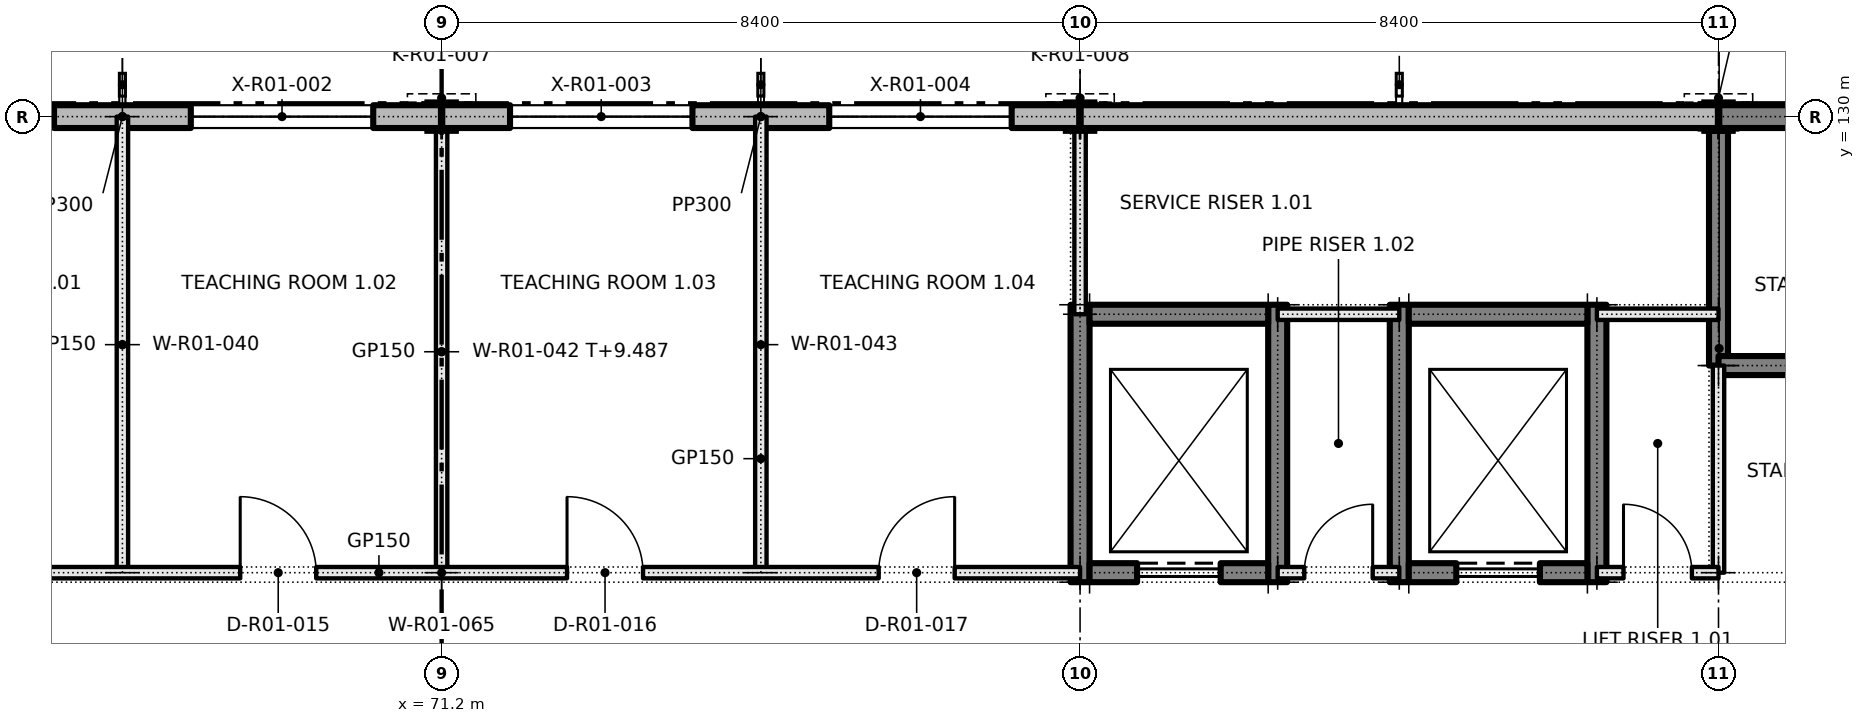
"""IFC4 building model, lengths in metres.
Left out: names, types, materials, properties, quantities, classifications, styles, units other than length and angle.
Written with IfcOpenShell. Run it as: python <this file> out.ifc"""

import sys

from ifc_helpers import new_model, si_unit, direction, frame, frame_2d, origin, origin_2d, place, context, subcontext, project, spatial, rectangle, i_section, extrude, element, fill, save


model = new_model("IFC4")
c1 = context("Model", 3, precision=1e-05, world=origin(), true_north=direction((0.0, 1.0)))
c2 = subcontext(c1, "Body", "Model", "MODEL_VIEW")
j1 = project(units=[si_unit("LENGTHUNIT", "METRE"), si_unit("PLANEANGLEUNIT", "RADIAN")], contexts=[c1])
p1 = place(None, origin())
s1 = spatial("IfcSite", under=j1, at=p1, CompositionType="ELEMENT")
p2 = place(p1, origin())
s2 = spatial("IfcBuilding", under=s1, at=p2, CompositionType="ELEMENT")
p3 = place(p2, frame((0.0, 0.0, 5.4)))
s3 = spatial("IfcBuildingStorey", under=s2, at=p3, CompositionType="ELEMENT", Elevation=5.4)
for number, where, z_axis, x_axis in (
    (1, (79.6, 123.875, 0.0), (0.0, 0.0, 1.0), (0.0, 1.0, 0.0)),
    (2, (82.2, 123.875, 0.0), (0.0, 0.0, 1.0), (0.0, 1.0, 0.0)),
):
    element("IfcWall", number, at=place(p3, frame(where, z_axis=z_axis, x_axis=x_axis)), inside=s3, PredefinedType="SOLIDWALL", context=c2, shape_type="SweptSolid", body=[
        extrude(rectangle(XDim=3.65, YDim=0.25, at=frame_2d((1.825, 0.0))), origin(), (0.0, 0.0, 1.0), 4.8),
    ])
p4 = place(p3, frame((79.725, 124.0, 0.0), z_axis=(0.0, 0.0, 1.0), x_axis=(1.0, 0.0, 0.0)))
e3 = element("IfcWall", 3, at=p4, inside=s3, PredefinedType="SOLIDWALL", context=c2, shape_type="SweptSolid", body=[
    extrude(rectangle(XDim=2.35, YDim=0.25, at=frame_2d((1.175, 0.0))), origin(), (0.0, 0.0, 1.0), 4.8),
])
p5 = place(p4, frame((0.625, 0.0, 0.0)))
e4 = element("IfcOpeningElement", 4, at=p5, cuts=e3, PredefinedType="OPENING", context=c2, shape_type="SweptSolid", body=[
    extrude(rectangle(XDim=1.1, YDim=2.1, at=frame_2d((0.55, 1.05))), frame((0.0, 0.135, 0.0), z_axis=(0.0, -1.0, 0.0), x_axis=(1.0, 0.0, 0.0)), (0.0, 0.0, 1.0), 0.27),
])
p6 = place(p3, frame((79.725, 127.4, 0.0), z_axis=(0.0, 0.0, 1.0), x_axis=(1.0, 0.0, 0.0)))
e5 = element("IfcWall", 5, at=p6, inside=s3, PredefinedType="SOLIDWALL", context=c2, shape_type="SweptSolid", body=[
    extrude(rectangle(XDim=2.35, YDim=0.25, at=frame_2d((1.175, 0.0))), origin(), (0.0, 0.0, 1.0), 4.8),
])
for number, where, z_axis, x_axis in (
    (6, (83.8, 123.875, 0.0), (0.0, 0.0, 1.0), (0.0, 1.0, 0.0)),
    (7, (86.4, 123.875, 0.0), (0.0, 0.0, 1.0), (0.0, 1.0, 0.0)),
):
    element("IfcWall", number, at=place(p3, frame(where, z_axis=z_axis, x_axis=x_axis)), inside=s3, PredefinedType="SOLIDWALL", context=c2, shape_type="SweptSolid", body=[
        extrude(rectangle(XDim=3.65, YDim=0.25, at=frame_2d((1.825, 0.0))), origin(), (0.0, 0.0, 1.0), 4.8),
    ])
p7 = place(p3, frame((83.925, 124.0, 0.0), z_axis=(0.0, 0.0, 1.0), x_axis=(1.0, 0.0, 0.0)))
e8 = element("IfcWall", 8, at=p7, inside=s3, PredefinedType="SOLIDWALL", context=c2, shape_type="SweptSolid", body=[
    extrude(rectangle(XDim=2.35, YDim=0.25, at=frame_2d((1.175, 0.0))), origin(), (0.0, 0.0, 1.0), 4.8),
])
p8 = place(p7, frame((0.625, 0.0, 0.0)))
e9 = element("IfcOpeningElement", 9, at=p8, cuts=e8, PredefinedType="OPENING", context=c2, shape_type="SweptSolid", body=[
    extrude(rectangle(XDim=1.1, YDim=2.1, at=frame_2d((0.55, 1.05))), frame((0.0, 0.135, 0.0), z_axis=(0.0, -1.0, 0.0), x_axis=(1.0, 0.0, 0.0)), (0.0, 0.0, 1.0), 0.27),
])
p9 = place(p3, frame((83.925, 127.4, 0.0), z_axis=(0.0, 0.0, 1.0), x_axis=(1.0, 0.0, 0.0)))
e10 = element("IfcWall", 10, at=p9, inside=s3, PredefinedType="SOLIDWALL", context=c2, shape_type="SweptSolid", body=[
    extrude(rectangle(XDim=2.35, YDim=0.25, at=frame_2d((1.175, 0.0))), origin(), (0.0, 0.0, 1.0), 4.8),
])
for number, where, z_axis, x_axis in (
    (11, (71.2, 130.0, 0.0), (0.0, 0.0, 1.0), (1.0, 0.0, 0.0)),
    (12, (79.6, 130.0, 0.0), (0.0, 0.0, 1.0), (1.0, 0.0, 0.0)),
    (13, (88.0, 130.0, 0.0), (0.0, 0.0, 1.0), (1.0, 0.0, 0.0)),
):
    element("IfcColumn", number, at=place(p3, frame(where, z_axis=z_axis, x_axis=x_axis)), inside=s3, PredefinedType="COLUMN", context=c2, shape_type="SweptSolid", body=[
        extrude(i_section(OverallWidth=0.373, OverallDepth=0.373, WebThickness=0.016, FlangeThickness=0.026, FilletRadius=0.015, at=origin_2d()), origin(), (0.0, 0.0, 1.0), 4.8),
    ])
p10 = place(p3, frame((88.0, 126.725, 0.0), z_axis=(0.0, 0.0, 1.0), x_axis=(0.0, 1.0, 0.0)))
e14 = element("IfcWall", 14, at=p10, inside=s3, PredefinedType="SHEAR", context=c2, shape_type="SweptSolid", body=[
    extrude(rectangle(XDim=3.088, YDim=0.25, at=frame_2d((1.544, 0.0))), origin(), (0.0, 0.0, 1.0), 4.8),
])
p11 = place(p3, frame((88.0, 126.725, 0.0), z_axis=(0.0, 0.0, 1.0), x_axis=(1.0, 0.0, 0.0)))
e15 = element("IfcWall", 15, at=p11, inside=s3, PredefinedType="SHEAR", context=c2, shape_type="SweptSolid", body=[
    extrude(rectangle(XDim=8.4, YDim=0.25, at=frame_2d((4.2, 0.0))), origin(), (0.0, 0.0, 1.0), 4.8),
])
p12 = place(p11, frame((6.625, 0.0, 0.0)))
e16 = element("IfcOpeningElement", 16, at=p12, cuts=e15, PredefinedType="OPENING", context=c2, shape_type="SweptSolid", body=[
    extrude(rectangle(XDim=1.2, YDim=2.1, at=frame_2d((0.6, 1.05))), frame((0.0, 0.135, 0.0), z_axis=(0.0, -1.0, 0.0), x_axis=(1.0, 0.0, 0.0)), (0.0, 0.0, 1.0), 0.27),
])
p13 = place(p3, frame((87.992, 130.0, 0.0), z_axis=(0.0, 0.0, 1.0), x_axis=(1.0, 0.0, 0.0)))
e17 = element("IfcWall", 17, at=p13, inside=s3, PredefinedType="SHEAR", context=c2, shape_type="SweptSolid", body=[
    extrude(rectangle(XDim=8.4, YDim=0.3, at=frame_2d((4.2, 0.0))), origin(), (0.0, 0.0, 1.0), 4.8),
])
p14 = place(p3, frame((62.792, 130.0, 0.0), z_axis=(0.0, 0.0, 1.0), x_axis=(1.0, 0.0, 0.0)))
e18 = element("IfcWall", 18, at=p14, inside=s3, PredefinedType="SOLIDWALL", context=c2, shape_type="SweptSolid", body=[
    extrude(rectangle(XDim=8.417, YDim=0.3, at=frame_2d((4.208, 0.0))), origin(), (0.0, 0.0, 1.0), 4.008),
])
p15 = place(p14, frame((0.908, 0.0, 0.95)))
e19 = element("IfcOpeningElement", 19, at=p15, cuts=e18, PredefinedType="OPENING", context=c2, shape_type="SweptSolid", body=[
    extrude(rectangle(XDim=2.4, YDim=1.8, at=frame_2d((1.2, 0.9))), frame((0.0, 0.16, 0.0), z_axis=(0.0, -1.0, 0.0), x_axis=(1.0, 0.0, 0.0)), (0.0, 0.0, 1.0), 0.32),
])
p16 = place(p14, frame((5.108, 0.0, 0.95)))
e20 = element("IfcOpeningElement", 20, at=p16, cuts=e18, PredefinedType="OPENING", context=c2, shape_type="SweptSolid", body=[
    extrude(rectangle(XDim=2.4, YDim=1.8, at=frame_2d((1.2, 0.9))), frame((0.0, 0.16, 0.0), z_axis=(0.0, -1.0, 0.0), x_axis=(1.0, 0.0, 0.0)), (0.0, 0.0, 1.0), 0.32),
])
p17 = place(p3, frame((71.192, 130.0, 0.0), z_axis=(0.0, 0.0, 1.0), x_axis=(1.0, 0.0, 0.0)))
e21 = element("IfcWall", 21, at=p17, inside=s3, PredefinedType="SOLIDWALL", context=c2, shape_type="SweptSolid", body=[
    extrude(rectangle(XDim=8.416, YDim=0.3, at=frame_2d((4.208, 0.0))), origin(), (0.0, 0.0, 1.0), 4.008),
])
p18 = place(p17, frame((0.908, 0.0, 0.95)))
e22 = element("IfcOpeningElement", 22, at=p18, cuts=e21, PredefinedType="OPENING", context=c2, shape_type="SweptSolid", body=[
    extrude(rectangle(XDim=2.4, YDim=1.8, at=frame_2d((1.2, 0.9))), frame((0.0, 0.16, 0.0), z_axis=(0.0, -1.0, 0.0), x_axis=(1.0, 0.0, 0.0)), (0.0, 0.0, 1.0), 0.32),
])
p19 = place(p17, frame((5.108, 0.0, 0.95)))
e23 = element("IfcOpeningElement", 23, at=p19, cuts=e21, PredefinedType="OPENING", context=c2, shape_type="SweptSolid", body=[
    extrude(rectangle(XDim=2.4, YDim=1.8, at=frame_2d((1.2, 0.9))), frame((0.0, 0.16, 0.0), z_axis=(0.0, -1.0, 0.0), x_axis=(1.0, 0.0, 0.0)), (0.0, 0.0, 1.0), 0.32),
])
p20 = place(p3, frame((79.592, 130.0, 0.0), z_axis=(0.0, 0.0, 1.0), x_axis=(1.0, 0.0, 0.0)))
e24 = element("IfcWall", 24, at=p20, inside=s3, PredefinedType="SOLIDWALL", context=c2, shape_type="SweptSolid", body=[
    extrude(rectangle(XDim=8.417, YDim=0.3, at=frame_2d((4.208, 0.0))), origin(), (0.0, 0.0, 1.0), 4.008),
])
p21 = place(p3, frame((67.0, 124.0, 0.0), z_axis=(0.0, 0.0, 1.0), x_axis=(0.0, 1.0, 0.0)))
e25 = element("IfcWall", 25, at=p21, inside=s3, PredefinedType="PARTITIONING", context=c2, shape_type="SweptSolid", body=[
    extrude(rectangle(XDim=6.0, YDim=0.15, at=frame_2d((3.0, 0.0))), origin(), (0.0, 0.0, 1.0), 4.8),
])
p22 = place(p3, frame((71.2, 124.0, 0.0), z_axis=(0.0, 0.0, 1.0), x_axis=(0.0, 1.0, 0.0)))
e26 = element("IfcWall", 26, at=p22, inside=s3, PredefinedType="PARTITIONING", context=c2, shape_type="SweptSolid", body=[
    extrude(rectangle(XDim=5.813, YDim=0.15, at=frame_2d((2.907, 0.0))), origin(), (0.0, 0.0, 1.0), 4.087),
])
p23 = place(p3, frame((75.4, 124.0, 0.0), z_axis=(0.0, 0.0, 1.0), x_axis=(0.0, 1.0, 0.0)))
e27 = element("IfcWall", 27, at=p23, inside=s3, PredefinedType="PARTITIONING", context=c2, shape_type="SweptSolid", body=[
    extrude(rectangle(XDim=6.0, YDim=0.15, at=frame_2d((3.0, 0.0))), origin(), (0.0, 0.0, 1.0), 4.8),
])
p24 = place(p3, frame((79.6, 127.4, 0.0), z_axis=(0.0, 0.0, 1.0), x_axis=(0.0, 1.0, 0.0)))
e28 = element("IfcWall", 28, at=p24, inside=s3, PredefinedType="PARTITIONING", context=c2, shape_type="SweptSolid", body=[
    extrude(rectangle(XDim=2.413, YDim=0.15, at=frame_2d((1.207, 0.0))), origin(), (0.0, 0.0, 1.0), 4.087),
])
p25 = place(p3, frame((88.0, 124.0, 0.0), z_axis=(0.0, 0.0, 1.0), x_axis=(0.0, 1.0, 0.0)))
e29 = element("IfcWall", 29, at=p25, inside=s3, PredefinedType="PARTITIONING", context=c2, shape_type="SweptSolid", body=[
    extrude(rectangle(XDim=2.725, YDim=0.15, at=frame_2d((1.363, 0.0))), origin(), (0.0, 0.0, 1.0), 4.087),
])
p26 = place(p3, frame((62.8, 124.0, 0.0), z_axis=(0.0, 0.0, 1.0), x_axis=(1.0, 0.0, 0.0)))
e30 = element("IfcWall", 30, at=p26, inside=s3, PredefinedType="PARTITIONING", context=c2, shape_type="SweptSolid", body=[
    extrude(rectangle(XDim=16.8, YDim=0.15, at=frame_2d((8.4, 0.0))), origin(), (0.0, 0.0, 1.0), 4.8),
])
p27 = place(p26, frame((1.65, 0.0, 0.0)))
e31 = element("IfcOpeningElement", 31, at=p27, cuts=e30, PredefinedType="OPENING", context=c2, shape_type="SweptSolid", body=[
    extrude(rectangle(XDim=1.0, YDim=2.1, at=frame_2d((0.5, 1.05))), frame((0.0, 0.085, 0.0), z_axis=(0.0, -1.0, 0.0), x_axis=(1.0, 0.0, 0.0)), (0.0, 0.0, 1.0), 0.17),
])
p28 = place(p26, frame((5.75, 0.0, 0.0)))
e32 = element("IfcOpeningElement", 32, at=p28, cuts=e30, PredefinedType="OPENING", context=c2, shape_type="SweptSolid", body=[
    extrude(rectangle(XDim=1.0, YDim=2.1, at=frame_2d((0.5, 1.05))), frame((0.0, 0.085, 0.0), z_axis=(0.0, -1.0, 0.0), x_axis=(1.0, 0.0, 0.0)), (0.0, 0.0, 1.0), 0.17),
])
p29 = place(p26, frame((10.05, 0.0, 0.0)))
e33 = element("IfcOpeningElement", 33, at=p29, cuts=e30, PredefinedType="OPENING", context=c2, shape_type="SweptSolid", body=[
    extrude(rectangle(XDim=1.0, YDim=2.1, at=frame_2d((0.5, 1.05))), frame((0.0, 0.085, 0.0), z_axis=(0.0, -1.0, 0.0), x_axis=(1.0, 0.0, 0.0)), (0.0, 0.0, 1.0), 0.17),
])
p30 = place(p26, frame((14.15, 0.0, 0.0)))
e34 = element("IfcOpeningElement", 34, at=p30, cuts=e30, PredefinedType="OPENING", context=c2, shape_type="SweptSolid", body=[
    extrude(rectangle(XDim=1.0, YDim=2.1, at=frame_2d((0.5, 1.05))), frame((0.0, 0.085, 0.0), z_axis=(0.0, -1.0, 0.0), x_axis=(1.0, 0.0, 0.0)), (0.0, 0.0, 1.0), 0.17),
])
p31 = place(p3, frame((82.2, 124.0, 0.0), z_axis=(0.0, 0.0, 1.0), x_axis=(1.0, 0.0, 0.0)))
e35 = element("IfcWall", 35, at=p31, inside=s3, PredefinedType="PARTITIONING", context=c2, shape_type="SweptSolid", body=[
    extrude(rectangle(XDim=1.6, YDim=0.15, at=frame_2d((0.8, 0.0))), origin(), (0.0, 0.0, 1.0), 4.8),
])
p32 = place(p31, frame((0.35, 0.0, 0.0)))
e36 = element("IfcOpeningElement", 36, at=p32, cuts=e35, PredefinedType="OPENING", context=c2, shape_type="SweptSolid", body=[
    extrude(rectangle(XDim=0.9, YDim=2.1, at=frame_2d((0.45, 1.05))), frame((0.0, 0.085, 0.0), z_axis=(0.0, -1.0, 0.0), x_axis=(1.0, 0.0, 0.0)), (0.0, 0.0, 1.0), 0.17),
])
p33 = place(p3, frame((86.4, 124.0, 0.0), z_axis=(0.0, 0.0, 1.0), x_axis=(1.0, 0.0, 0.0)))
e37 = element("IfcWall", 37, at=p33, inside=s3, PredefinedType="PARTITIONING", context=c2, shape_type="SweptSolid", body=[
    extrude(rectangle(XDim=1.6, YDim=0.15, at=frame_2d((0.8, 0.0))), origin(), (0.0, 0.0, 1.0), 4.8),
])
p34 = place(p33, frame((0.35, 0.0, 0.0)))
e38 = element("IfcOpeningElement", 38, at=p34, cuts=e37, PredefinedType="OPENING", context=c2, shape_type="SweptSolid", body=[
    extrude(rectangle(XDim=0.9, YDim=2.1, at=frame_2d((0.45, 1.05))), frame((0.0, 0.085, 0.0), z_axis=(0.0, -1.0, 0.0), x_axis=(1.0, 0.0, 0.0)), (0.0, 0.0, 1.0), 0.17),
])
for number, where, z_axis, x_axis in (
    (39, (82.2, 127.4, 0.0), (0.0, 0.0, 1.0), (1.0, 0.0, 0.0)),
    (40, (86.4, 127.4, 0.0), (0.0, 0.0, 1.0), (1.0, 0.0, 0.0)),
):
    element("IfcWall", number, at=place(p3, frame(where, z_axis=z_axis, x_axis=x_axis)), inside=s3, PredefinedType="PARTITIONING", context=c2, shape_type="SweptSolid", body=[
        extrude(rectangle(XDim=1.6, YDim=0.15, at=frame_2d((0.8, 0.0))), origin(), (0.0, 0.0, 1.0), 4.8),
    ])
p35 = place(p5, origin())
e41 = element("IfcDoor", 41, at=p35, inside=s3, OperationType="SLIDING_TO_LEFT", PredefinedType="DOOR", context=c2, shape_type="SweptSolid", body=[
    extrude(rectangle(XDim=1.1, YDim=2.1, at=frame_2d((0.55, 1.05))), frame((0.0, 0.025, 0.0), z_axis=(0.0, -1.0, 0.0), x_axis=(1.0, 0.0, 0.0)), (0.0, 0.0, 1.0), 0.05),
])
fill(e4, e41)
p36 = place(p8, origin())
e42 = element("IfcDoor", 42, at=p36, inside=s3, OperationType="SLIDING_TO_LEFT", PredefinedType="DOOR", context=c2, shape_type="SweptSolid", body=[
    extrude(rectangle(XDim=1.1, YDim=2.1, at=frame_2d((0.55, 1.05))), frame((0.0, 0.025, 0.0), z_axis=(0.0, -1.0, 0.0), x_axis=(1.0, 0.0, 0.0)), (0.0, 0.0, 1.0), 0.05),
])
fill(e9, e42)
p37 = place(p15, origin())
e43 = element("IfcWindow", 43, at=p37, inside=s3, PartitioningType="DOUBLE_PANEL_VERTICAL", PredefinedType="WINDOW", context=c2, shape_type="SweptSolid", body=[
    extrude(rectangle(XDim=2.4, YDim=1.8, at=frame_2d((1.2, 0.9))), frame((0.0, 0.03, 0.0), z_axis=(0.0, -1.0, 0.0), x_axis=(1.0, 0.0, 0.0)), (0.0, 0.0, 1.0), 0.06),
])
fill(e19, e43)
p38 = place(p16, origin())
e44 = element("IfcWindow", 44, at=p38, inside=s3, PartitioningType="DOUBLE_PANEL_VERTICAL", PredefinedType="WINDOW", context=c2, shape_type="SweptSolid", body=[
    extrude(rectangle(XDim=2.4, YDim=1.8, at=frame_2d((1.2, 0.9))), frame((0.0, 0.03, 0.0), z_axis=(0.0, -1.0, 0.0), x_axis=(1.0, 0.0, 0.0)), (0.0, 0.0, 1.0), 0.06),
])
fill(e20, e44)
p39 = place(p18, origin())
e45 = element("IfcWindow", 45, at=p39, inside=s3, PartitioningType="DOUBLE_PANEL_VERTICAL", PredefinedType="WINDOW", context=c2, shape_type="SweptSolid", body=[
    extrude(rectangle(XDim=2.4, YDim=1.8, at=frame_2d((1.2, 0.9))), frame((0.0, 0.03, 0.0), z_axis=(0.0, -1.0, 0.0), x_axis=(1.0, 0.0, 0.0)), (0.0, 0.0, 1.0), 0.06),
])
fill(e22, e45)
p40 = place(p19, origin())
e46 = element("IfcWindow", 46, at=p40, inside=s3, PartitioningType="DOUBLE_PANEL_VERTICAL", PredefinedType="WINDOW", context=c2, shape_type="SweptSolid", body=[
    extrude(rectangle(XDim=2.4, YDim=1.8, at=frame_2d((1.2, 0.9))), frame((0.0, 0.03, 0.0), z_axis=(0.0, -1.0, 0.0), x_axis=(1.0, 0.0, 0.0)), (0.0, 0.0, 1.0), 0.06),
])
fill(e23, e46)
p41 = place(p32, origin())
e47 = element("IfcDoor", 47, at=p41, inside=s3, OperationType="SINGLE_SWING_RIGHT", PredefinedType="DOOR", context=c2, shape_type="SweptSolid", body=[
    extrude(rectangle(XDim=0.9, YDim=2.1, at=frame_2d((0.45, 1.05))), frame((0.0, 0.025, 0.0), z_axis=(0.0, -1.0, 0.0), x_axis=(1.0, 0.0, 0.0)), (0.0, 0.0, 1.0), 0.05),
])
fill(e36, e47)
p42 = place(p34, origin())
e48 = element("IfcDoor", 48, at=p42, inside=s3, OperationType="SINGLE_SWING_LEFT", PredefinedType="DOOR", context=c2, shape_type="SweptSolid", body=[
    extrude(rectangle(XDim=0.9, YDim=2.1, at=frame_2d((0.45, 1.05))), frame((0.0, 0.025, 0.0), z_axis=(0.0, -1.0, 0.0), x_axis=(1.0, 0.0, 0.0)), (0.0, 0.0, 1.0), 0.05),
])
fill(e38, e48)
p43 = place(p28, origin())
e49 = element("IfcDoor", 49, at=p43, inside=s3, OperationType="SINGLE_SWING_LEFT", PredefinedType="DOOR", context=c2, shape_type="SweptSolid", body=[
    extrude(rectangle(XDim=1.0, YDim=2.1, at=frame_2d((0.5, 1.05))), frame((0.0, 0.025, 0.0), z_axis=(0.0, -1.0, 0.0), x_axis=(1.0, 0.0, 0.0)), (0.0, 0.0, 1.0), 0.05),
])
fill(e32, e49)
p44 = place(p29, origin())
e50 = element("IfcDoor", 50, at=p44, inside=s3, OperationType="SINGLE_SWING_LEFT", PredefinedType="DOOR", context=c2, shape_type="SweptSolid", body=[
    extrude(rectangle(XDim=1.0, YDim=2.1, at=frame_2d((0.5, 1.05))), frame((0.0, 0.025, 0.0), z_axis=(0.0, -1.0, 0.0), x_axis=(1.0, 0.0, 0.0)), (0.0, 0.0, 1.0), 0.05),
])
fill(e33, e50)
p45 = place(p30, origin())
e51 = element("IfcDoor", 51, at=p45, inside=s3, OperationType="SINGLE_SWING_RIGHT", PredefinedType="DOOR", context=c2, shape_type="SweptSolid", body=[
    extrude(rectangle(XDim=1.0, YDim=2.1, at=frame_2d((0.5, 1.05))), frame((0.0, 0.025, 0.0), z_axis=(0.0, -1.0, 0.0), x_axis=(1.0, 0.0, 0.0)), (0.0, 0.0, 1.0), 0.05),
])
fill(e34, e51)
save(model, sys.argv[1])
